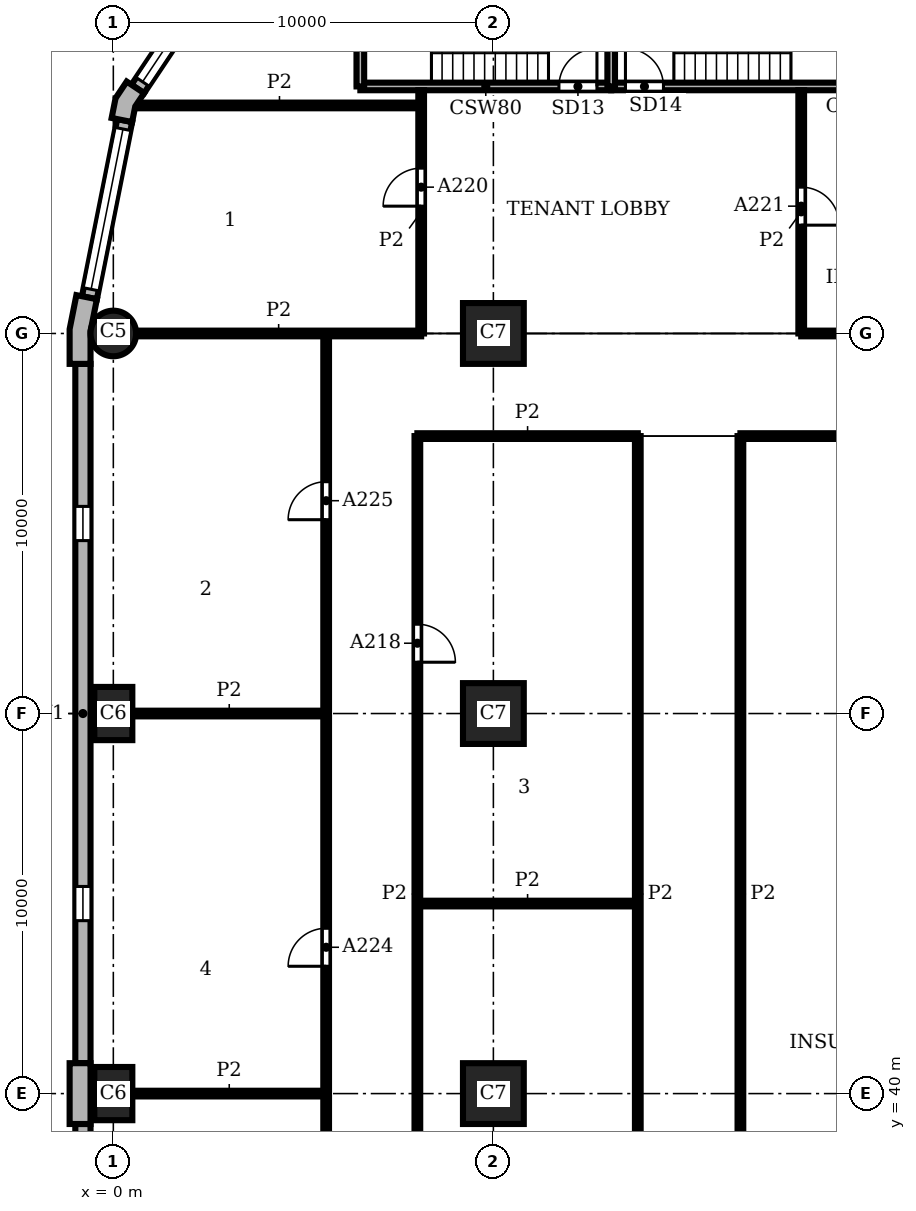
"""IFC4 building model, lengths in metres.
Left out: names, types, materials, properties, quantities, classifications, styles, units other than length and angle.
Written with IfcOpenShell. Run it as: python <this file> out.ifc"""

import sys

from ifc_helpers import new_model, si_unit, direction, frame, frame_2d, origin, origin_2d, place, context, subcontext, project, spatial, polyline, rectangle, circle, outline, extrude, element, fill, save


model = new_model("IFC4")
c1 = context("Model", 3, precision=1e-05, world=origin(), true_north=direction((0.0, 1.0)))
c2 = subcontext(c1, "Body", "Model", "MODEL_VIEW")
j1 = project(units=[si_unit("LENGTHUNIT", "METRE"), si_unit("PLANEANGLEUNIT", "RADIAN")], contexts=[c1])
p1 = place(None, origin())
s1 = spatial("IfcSite", under=j1, at=p1, CompositionType="ELEMENT")
p2 = place(p1, origin())
s2 = spatial("IfcBuilding", under=s1, at=p2, CompositionType="ELEMENT")
p3 = place(p2, frame((0.0, 0.0, 23.7)))
s3 = spatial("IfcBuildingStorey", under=s2, at=p3, CompositionType="ELEMENT", Elevation=23.7)
p4 = place(p3, frame((0.0, 60.0, 0.0), z_axis=(0.0, 0.0, 1.0), x_axis=(1.0, 0.0, 0.0)))
e1 = element("IfcColumn", 1, at=p4, inside=s3, PredefinedType="COLUMN", context=c2, shape_type="SweptSolid", body=[
    extrude(circle(Radius=0.6, at=origin_2d()), origin(), (0.0, 0.0, 1.0), 3.9),
])
for number, where, z_axis, x_axis in (
    (2, (0.0, 50.0, 0.0), (0.0, 0.0, 1.0), (0.0, 1.0, 0.0)),
    (3, (0.0, 40.0, 0.0), (0.0, 0.0, 1.0), (0.0, 1.0, 0.0)),
):
    element("IfcColumn", number, at=place(p3, frame(where, z_axis=z_axis, x_axis=x_axis)), inside=s3, PredefinedType="COLUMN", context=c2, shape_type="SweptSolid", body=[
        extrude(rectangle(XDim=1.4, YDim=1.0, at=origin_2d()), origin(), (0.0, 0.0, 1.0), 3.9),
    ])
for number, where, z_axis, x_axis in (
    (4, (10.0, 40.0, 0.0), (0.0, 0.0, 1.0), (1.0, 0.0, 0.0)),
    (5, (10.0, 50.0, 0.0), (0.0, 0.0, 1.0), (1.0, 0.0, 0.0)),
    (6, (10.0, 60.0, 0.0), (0.0, 0.0, 1.0), (1.0, 0.0, 0.0)),
):
    element("IfcColumn", number, at=place(p3, frame(where, z_axis=z_axis, x_axis=x_axis)), inside=s3, PredefinedType="COLUMN", context=c2, shape_type="SweptSolid", body=[
        extrude(rectangle(XDim=1.6, YDim=1.6, at=origin_2d()), origin(), (0.0, 0.0, 1.0), 3.9),
    ])
p5 = place(p3, origin())
e7 = element("IfcWall", 7, at=p5, inside=s3, PredefinedType="SOLIDWALL", context=c2, shape_type="SweptSolid", body=[
    extrude(outline(polyline([(0.477, 66.545), (0.352, 66.629), (0.059, 66.189), (-0.045, 65.67), (0.103, 65.641), (0.495, 65.563), (0.577, 65.974), (0.81, 66.323), (0.477, 66.545)])), origin(), (0.0, 0.0, 1.0), 3.9),
])
e8 = element("IfcWall", 8, at=p5, inside=s3, PredefinedType="SOLIDWALL", context=c2, shape_type="SweptSolid", body=[
    extrude(outline(polyline([(-0.825, 60.98), (-0.972, 61.009), (-1.15, 60.113), (-1.15, 59.2), (-1.0, 59.2), (-0.6, 59.2), (-0.6, 60.059), (-0.432, 60.902), (-0.825, 60.98)])), origin(), (0.0, 0.0, 1.0), 3.9),
])
e9 = element("IfcWall", 9, at=p5, inside=s3, PredefinedType="SOLIDWALL", context=c2, shape_type="SweptSolid", body=[
    extrude(outline(polyline([(-1.0, 40.8), (-1.15, 40.8), (-1.15, 40.0), (-1.15, 39.2), (-1.0, 39.2), (-0.6, 39.2), (-0.6, 40.0), (-0.6, 40.8), (-1.0, 40.8)])), origin(), (0.0, 0.0, 1.0), 3.9),
])
p6 = place(p3, frame((3.284, 70.386, 0.0), z_axis=(0.0, 0.0, 1.0), x_axis=(-0.555541552266, -0.831488775454, 0.0)))
e10 = element("IfcWall", 10, at=p6, inside=s3, PredefinedType="SOLIDWALL", context=c2, shape_type="SweptSolid", body=[
    extrude(rectangle(XDim=4.753, YDim=0.4, at=frame_2d((2.376, 0.0))), origin(), (0.0, 0.0, 1.0), 3.9),
])
p7 = place(p6, frame((0.226, 0.0, 0.9)))
e11 = element("IfcOpeningElement", 11, at=p7, cuts=e10, PredefinedType="OPENING", context=c2, shape_type="SweptSolid", body=[
    extrude(rectangle(XDim=4.3, YDim=2.35, at=frame_2d((2.15, 1.175))), frame((0.0, 0.21, 0.0), z_axis=(0.0, -1.0, 0.0), x_axis=(1.0, 0.0, 0.0)), (0.0, 0.0, 1.0), 0.42),
])
p8 = place(p3, frame((0.299, 65.602, 0.0), z_axis=(0.0, 0.0, 1.0), x_axis=(-0.195098533057, -0.98078364709, 0.0)))
e12 = element("IfcWall", 12, at=p8, inside=s3, PredefinedType="SOLIDWALL", context=c2, shape_type="SweptSolid", body=[
    extrude(rectangle(XDim=4.753, YDim=0.4, at=frame_2d((2.376, 0.0))), origin(), (0.0, 0.0, 1.0), 3.9),
])
p9 = place(p8, frame((0.226, 0.0, 0.9)))
e13 = element("IfcOpeningElement", 13, at=p9, cuts=e12, PredefinedType="OPENING", context=c2, shape_type="SweptSolid", body=[
    extrude(rectangle(XDim=4.3, YDim=2.35, at=frame_2d((2.15, 1.175))), frame((0.0, 0.21, 0.0), z_axis=(0.0, -1.0, 0.0), x_axis=(1.0, 0.0, 0.0)), (0.0, 0.0, 1.0), 0.42),
])
p10 = place(p3, frame((-0.8, 59.2, 0.0), z_axis=(0.0, 0.0, 1.0), x_axis=(0.0, -1.0, 0.0)))
e14 = element("IfcWall", 14, at=p10, inside=s3, PredefinedType="SOLIDWALL", context=c2, shape_type="SweptSolid", body=[
    extrude(rectangle(XDim=18.4, YDim=0.4, at=frame_2d((9.2, 0.0))), origin(), (0.0, 0.0, 1.0), 3.9),
])
p11 = place(p10, frame((3.75, 0.0, 0.9)))
e15 = element("IfcOpeningElement", 15, at=p11, cuts=e14, PredefinedType="OPENING", context=c2, shape_type="SweptSolid", body=[
    extrude(rectangle(XDim=0.9, YDim=2.35, at=frame_2d((0.45, 1.175))), frame((0.0, 0.21, 0.0), z_axis=(0.0, -1.0, 0.0), x_axis=(1.0, 0.0, 0.0)), (0.0, 0.0, 1.0), 0.42),
])
p12 = place(p10, frame((13.75, 0.0, 0.9)))
e16 = element("IfcOpeningElement", 16, at=p12, cuts=e14, PredefinedType="OPENING", context=c2, shape_type="SweptSolid", body=[
    extrude(rectangle(XDim=0.9, YDim=2.35, at=frame_2d((0.45, 1.175))), frame((0.0, 0.21, 0.0), z_axis=(0.0, -1.0, 0.0), x_axis=(1.0, 0.0, 0.0)), (0.0, 0.0, 1.0), 0.42),
])
p13 = place(p3, frame((-0.8, 39.2, 0.0), z_axis=(0.0, 0.0, 1.0), x_axis=(0.0, -1.0, 0.0)))
e17 = element("IfcWall", 17, at=p13, inside=s3, PredefinedType="SOLIDWALL", context=c2, shape_type="SweptSolid", body=[
    extrude(rectangle(XDim=18.4, YDim=0.4, at=frame_2d((9.2, 0.0))), origin(), (0.0, 0.0, 1.0), 3.9),
])
p14 = place(p13, frame((3.75, 0.0, 0.9)))
e18 = element("IfcOpeningElement", 18, at=p14, cuts=e17, PredefinedType="OPENING", context=c2, shape_type="SweptSolid", body=[
    extrude(rectangle(XDim=0.9, YDim=2.35, at=frame_2d((0.45, 1.175))), frame((0.0, 0.21, 0.0), z_axis=(0.0, -1.0, 0.0), x_axis=(1.0, 0.0, 0.0)), (0.0, 0.0, 1.0), 0.42),
])
p15 = place(p13, frame((13.75, 0.0, 0.9)))
e19 = element("IfcOpeningElement", 19, at=p15, cuts=e17, PredefinedType="OPENING", context=c2, shape_type="SweptSolid", body=[
    extrude(rectangle(XDim=0.9, YDim=2.35, at=frame_2d((0.45, 1.175))), frame((0.0, 0.21, 0.0), z_axis=(0.0, -1.0, 0.0), x_axis=(1.0, 0.0, 0.0)), (0.0, 0.0, 1.0), 0.42),
])
p16 = place(p3, frame((6.5, 66.5, 0.0), z_axis=(0.0, 0.0, 1.0), x_axis=(1.0, 0.0, 0.0)))
e20 = element("IfcWall", 20, at=p16, inside=s3, PredefinedType="SHEAR", context=c2, shape_type="SweptSolid", body=[
    extrude(rectangle(XDim=6.6, YDim=0.2, at=frame_2d((3.3, 0.0))), origin(), (0.0, 0.0, 1.0), 3.58),
])
p17 = place(p16, frame((5.225, 0.0, 0.0)))
e21 = element("IfcOpeningElement", 21, at=p17, cuts=e20, PredefinedType="OPENING", context=c2, shape_type="SweptSolid", body=[
    extrude(rectangle(XDim=1.0, YDim=2.1, at=frame_2d((0.5, 1.05))), frame((0.0, 0.11, 0.0), z_axis=(0.0, -1.0, 0.0), x_axis=(1.0, 0.0, 0.0)), (0.0, 0.0, 1.0), 0.22),
])
p18 = place(p3, frame((13.1, 66.5, 0.0), z_axis=(0.0, 0.0, 1.0), x_axis=(1.0, 0.0, 0.0)))
e22 = element("IfcWall", 22, at=p18, inside=s3, PredefinedType="SHEAR", context=c2, shape_type="SweptSolid", body=[
    extrude(rectangle(XDim=6.6, YDim=0.2, at=frame_2d((3.3, 0.0))), origin(), (0.0, 0.0, 1.0), 3.58),
])
p19 = place(p18, frame((0.375, 0.0, 0.0)))
e23 = element("IfcOpeningElement", 23, at=p19, cuts=e22, PredefinedType="OPENING", context=c2, shape_type="SweptSolid", body=[
    extrude(rectangle(XDim=1.0, YDim=2.1, at=frame_2d((0.5, 1.05))), frame((0.0, 0.11, 0.0), z_axis=(0.0, -1.0, 0.0), x_axis=(1.0, 0.0, 0.0)), (0.0, 0.0, 1.0), 0.22),
])
for number, where, z_axis, x_axis in (
    (24, (6.5, 66.5, 0.0), (0.0, 0.0, 1.0), (0.0, 1.0, 0.0)),
    (25, (13.1, 66.5, 0.0), (0.0, 0.0, 1.0), (0.0, 1.0, 0.0)),
):
    element("IfcWall", number, at=place(p3, frame(where, z_axis=z_axis, x_axis=x_axis)), inside=s3, PredefinedType="SHEAR", context=c2, shape_type="SweptSolid", body=[
        extrude(rectangle(XDim=3.3, YDim=0.2, at=frame_2d((1.65, 0.0))), origin(), (0.0, 0.0, 1.0), 3.58),
    ])
p20 = place(p3, frame((5.6, 5.6, 0.0), z_axis=(0.0, 0.0, 1.0), x_axis=(0.0, 1.0, 0.0)))
e26 = element("IfcWall", 26, at=p20, inside=s3, PredefinedType="PARTITIONING", context=c2, shape_type="SweptSolid", body=[
    extrude(rectangle(XDim=54.4, YDim=0.15, at=frame_2d((27.2, 0.0))), origin(), (0.0, 0.0, 1.0), 3.58),
])
p21 = place(p20, frame((6.0, 0.0, 0.0)))
e27 = element("IfcOpeningElement", 27, at=p21, cuts=e26, PredefinedType="OPENING", context=c2, shape_type="SweptSolid", body=[
    extrude(rectangle(XDim=1.0, YDim=2.1, at=frame_2d((0.5, 1.05))), frame((0.0, 0.085, 0.0), z_axis=(0.0, -1.0, 0.0), x_axis=(1.0, 0.0, 0.0)), (0.0, 0.0, 1.0), 0.17),
])
p22 = place(p20, frame((11.75, 0.0, 0.0)))
e28 = element("IfcOpeningElement", 28, at=p22, cuts=e26, PredefinedType="OPENING", context=c2, shape_type="SweptSolid", body=[
    extrude(rectangle(XDim=1.0, YDim=2.1, at=frame_2d((0.5, 1.05))), frame((0.0, 0.085, 0.0), z_axis=(0.0, -1.0, 0.0), x_axis=(1.0, 0.0, 0.0)), (0.0, 0.0, 1.0), 0.17),
])
p23 = place(p20, frame((18.75, 0.0, 0.0)))
e29 = element("IfcOpeningElement", 29, at=p23, cuts=e26, PredefinedType="OPENING", context=c2, shape_type="SweptSolid", body=[
    extrude(rectangle(XDim=1.0, YDim=2.1, at=frame_2d((0.5, 1.05))), frame((0.0, 0.085, 0.0), z_axis=(0.0, -1.0, 0.0), x_axis=(1.0, 0.0, 0.0)), (0.0, 0.0, 1.0), 0.17),
])
p24 = place(p20, frame((28.3, 0.0, 0.0)))
e30 = element("IfcOpeningElement", 30, at=p24, cuts=e26, PredefinedType="OPENING", context=c2, shape_type="SweptSolid", body=[
    extrude(rectangle(XDim=1.0, YDim=2.1, at=frame_2d((0.5, 1.05))), frame((0.0, 0.085, 0.0), z_axis=(0.0, -1.0, 0.0), x_axis=(1.0, 0.0, 0.0)), (0.0, 0.0, 1.0), 0.17),
])
p25 = place(p20, frame((37.75, 0.0, 0.0)))
e31 = element("IfcOpeningElement", 31, at=p25, cuts=e26, PredefinedType="OPENING", context=c2, shape_type="SweptSolid", body=[
    extrude(rectangle(XDim=1.0, YDim=2.1, at=frame_2d((0.5, 1.05))), frame((0.0, 0.085, 0.0), z_axis=(0.0, -1.0, 0.0), x_axis=(1.0, 0.0, 0.0)), (0.0, 0.0, 1.0), 0.17),
])
p26 = place(p20, frame((49.5, 0.0, 0.0)))
e32 = element("IfcOpeningElement", 32, at=p26, cuts=e26, PredefinedType="OPENING", context=c2, shape_type="SweptSolid", body=[
    extrude(rectangle(XDim=1.0, YDim=2.1, at=frame_2d((0.5, 1.05))), frame((0.0, 0.085, 0.0), z_axis=(0.0, -1.0, 0.0), x_axis=(1.0, 0.0, 0.0)), (0.0, 0.0, 1.0), 0.17),
])
p27 = place(p3, frame((8.0, 33.2, 0.0), z_axis=(0.0, 0.0, 1.0), x_axis=(0.0, 1.0, 0.0)))
e33 = element("IfcWall", 33, at=p27, inside=s3, PredefinedType="PARTITIONING", context=c2, shape_type="SweptSolid", body=[
    extrude(rectangle(XDim=24.1, YDim=0.15, at=frame_2d((12.05, 0.0))), origin(), (0.0, 0.0, 1.0), 3.58),
])
p28 = place(p27, frame((3.35, 0.0, 0.0)))
e34 = element("IfcOpeningElement", 34, at=p28, cuts=e33, PredefinedType="OPENING", context=c2, shape_type="SweptSolid", body=[
    extrude(rectangle(XDim=1.8, YDim=2.1, at=frame_2d((0.9, 1.05))), frame((0.0, 0.085, 0.0), z_axis=(0.0, -1.0, 0.0), x_axis=(1.0, 0.0, 0.0)), (0.0, 0.0, 1.0), 0.17),
])
p29 = place(p27, frame((18.15, 0.0, 0.0)))
e35 = element("IfcOpeningElement", 35, at=p29, cuts=e33, PredefinedType="OPENING", context=c2, shape_type="SweptSolid", body=[
    extrude(rectangle(XDim=1.0, YDim=2.1, at=frame_2d((0.5, 1.05))), frame((0.0, 0.085, 0.0), z_axis=(0.0, -1.0, 0.0), x_axis=(1.0, 0.0, 0.0)), (0.0, 0.0, 1.0), 0.17),
])
p30 = place(p3, frame((8.1, 60.0, 0.0), z_axis=(0.0, 0.0, 1.0), x_axis=(0.0, 1.0, 0.0)))
e36 = element("IfcWall", 36, at=p30, inside=s3, PredefinedType="PARTITIONING", context=c2, shape_type="SweptSolid", body=[
    extrude(rectangle(XDim=6.4, YDim=0.15, at=frame_2d((3.2, 0.0))), origin(), (0.0, 0.0, 1.0), 3.58),
])
p31 = place(p30, frame((3.35, 0.0, 0.0)))
e37 = element("IfcOpeningElement", 37, at=p31, cuts=e36, PredefinedType="OPENING", context=c2, shape_type="SweptSolid", body=[
    extrude(rectangle(XDim=1.0, YDim=2.1, at=frame_2d((0.5, 1.05))), frame((0.0, 0.085, 0.0), z_axis=(0.0, -1.0, 0.0), x_axis=(1.0, 0.0, 0.0)), (0.0, 0.0, 1.0), 0.17),
])
for number, where, z_axis, x_axis in (
    (38, (13.8, 33.2, 0.0), (0.0, 0.0, 1.0), (0.0, 1.0, 0.0)),
    (39, (16.5, 33.2, 0.0), (0.0, 0.0, 1.0), (0.0, 1.0, 0.0)),
):
    element("IfcWall", number, at=place(p3, frame(where, z_axis=z_axis, x_axis=x_axis)), inside=s3, PredefinedType="PARTITIONING", context=c2, shape_type="SweptSolid", body=[
        extrude(rectangle(XDim=24.1, YDim=0.15, at=frame_2d((12.05, 0.0))), origin(), (0.0, 0.0, 1.0), 3.58),
    ])
p32 = place(p3, frame((18.1, 60.0, 0.0), z_axis=(0.0, 0.0, 1.0), x_axis=(0.0, 1.0, 0.0)))
e40 = element("IfcWall", 40, at=p32, inside=s3, PredefinedType="PARTITIONING", context=c2, shape_type="SweptSolid", body=[
    extrude(rectangle(XDim=6.4, YDim=0.15, at=frame_2d((3.2, 0.0))), origin(), (0.0, 0.0, 1.0), 3.58),
])
p33 = place(p32, frame((2.85, 0.0, 0.0)))
e41 = element("IfcOpeningElement", 41, at=p33, cuts=e40, PredefinedType="OPENING", context=c2, shape_type="SweptSolid", body=[
    extrude(rectangle(XDim=1.0, YDim=2.1, at=frame_2d((0.5, 1.05))), frame((0.0, 0.085, 0.0), z_axis=(0.0, -1.0, 0.0), x_axis=(1.0, 0.0, 0.0)), (0.0, 0.0, 1.0), 0.17),
])
p34 = place(p3, frame((0.5, 40.0, 0.0), z_axis=(0.0, 0.0, 1.0), x_axis=(1.0, 0.0, 0.0)))
e42 = element("IfcWall", 42, at=p34, inside=s3, PredefinedType="PARTITIONING", context=c2, shape_type="SweptSolid", body=[
    extrude(rectangle(XDim=5.1, YDim=0.15, at=frame_2d((2.55, 0.0))), origin(), (0.0, 0.0, 1.0), 3.58),
])
p35 = place(p3, frame((8.0, 45.0, 0.0), z_axis=(0.0, 0.0, 1.0), x_axis=(1.0, 0.0, 0.0)))
e43 = element("IfcWall", 43, at=p35, inside=s3, PredefinedType="PARTITIONING", context=c2, shape_type="SweptSolid", body=[
    extrude(rectangle(XDim=5.8, YDim=0.15, at=frame_2d((2.9, 0.0))), origin(), (0.0, 0.0, 1.0), 3.58),
])
p36 = place(p3, frame((0.5, 50.0, 0.0), z_axis=(0.0, 0.0, 1.0), x_axis=(1.0, 0.0, 0.0)))
e44 = element("IfcWall", 44, at=p36, inside=s3, PredefinedType="PARTITIONING", context=c2, shape_type="SweptSolid", body=[
    extrude(rectangle(XDim=5.1, YDim=0.15, at=frame_2d((2.55, 0.0))), origin(), (0.0, 0.0, 1.0), 3.58),
])
p37 = place(p3, frame((8.0, 57.3, 0.0), z_axis=(0.0, 0.0, 1.0), x_axis=(1.0, 0.0, 0.0)))
e45 = element("IfcWall", 45, at=p37, inside=s3, PredefinedType="PARTITIONING", context=c2, shape_type="SweptSolid", body=[
    extrude(rectangle(XDim=5.8, YDim=0.15, at=frame_2d((2.9, 0.0))), origin(), (0.0, 0.0, 1.0), 3.58),
])
p38 = place(p3, frame((16.5, 57.3, 0.0), z_axis=(0.0, 0.0, 1.0), x_axis=(1.0, 0.0, 0.0)))
e46 = element("IfcWall", 46, at=p38, inside=s3, PredefinedType="PARTITIONING", context=c2, shape_type="SweptSolid", body=[
    extrude(rectangle(XDim=8.5, YDim=0.15, at=frame_2d((4.25, 0.0))), origin(), (0.0, 0.0, 1.0), 3.58),
])
p39 = place(p3, frame((0.6, 60.0, 0.0), z_axis=(0.0, 0.0, 1.0), x_axis=(1.0, 0.0, 0.0)))
e47 = element("IfcWall", 47, at=p39, inside=s3, PredefinedType="PARTITIONING", context=c2, shape_type="SweptSolid", body=[
    extrude(rectangle(XDim=7.5, YDim=0.15, at=frame_2d((3.75, 0.0))), origin(), (0.0, 0.0, 1.0), 3.58),
])
p40 = place(p3, frame((18.1, 60.0, 0.0), z_axis=(0.0, 0.0, 1.0), x_axis=(1.0, 0.0, 0.0)))
e48 = element("IfcWall", 48, at=p40, inside=s3, PredefinedType="PARTITIONING", context=c2, shape_type="SweptSolid", body=[
    extrude(rectangle(XDim=1.1, YDim=0.15, at=frame_2d((0.55, 0.0))), origin(), (0.0, 0.0, 1.0), 3.58),
])
p41 = place(p3, frame((0.644, 66.0, 0.0), z_axis=(0.0, 0.0, 1.0), x_axis=(1.0, 0.0, 0.0)))
e49 = element("IfcWall", 49, at=p41, inside=s3, PredefinedType="PARTITIONING", context=c2, shape_type="SweptSolid", body=[
    extrude(rectangle(XDim=7.456, YDim=0.15, at=frame_2d((3.728, 0.0))), origin(), (0.0, 0.0, 1.0), 3.58),
])
p42 = place(p7, origin())
e50 = element("IfcWindow", 50, at=p42, inside=s3, PartitioningType="SINGLE_PANEL", PredefinedType="WINDOW", context=c2, shape_type="SweptSolid", body=[
    extrude(rectangle(XDim=4.3, YDim=2.35, at=frame_2d((2.15, 1.175))), frame((0.0, 0.16, 0.0), z_axis=(0.0, -1.0, 0.0), x_axis=(1.0, 0.0, 0.0)), (0.0, 0.0, 1.0), 0.06),
])
fill(e11, e50)
p43 = place(p9, origin())
e51 = element("IfcWindow", 51, at=p43, inside=s3, PartitioningType="SINGLE_PANEL", PredefinedType="WINDOW", context=c2, shape_type="SweptSolid", body=[
    extrude(rectangle(XDim=4.3, YDim=2.35, at=frame_2d((2.15, 1.175))), frame((0.0, 0.16, 0.0), z_axis=(0.0, -1.0, 0.0), x_axis=(1.0, 0.0, 0.0)), (0.0, 0.0, 1.0), 0.06),
])
fill(e13, e51)
p44 = place(p11, origin())
e52 = element("IfcWindow", 52, at=p44, inside=s3, PartitioningType="SINGLE_PANEL", PredefinedType="WINDOW", context=c2, shape_type="SweptSolid", body=[
    extrude(rectangle(XDim=0.9, YDim=2.35, at=frame_2d((0.45, 1.175))), frame((0.0, 0.16, 0.0), z_axis=(0.0, -1.0, 0.0), x_axis=(1.0, 0.0, 0.0)), (0.0, 0.0, 1.0), 0.06),
])
fill(e15, e52)
p45 = place(p12, origin())
e53 = element("IfcWindow", 53, at=p45, inside=s3, PartitioningType="SINGLE_PANEL", PredefinedType="WINDOW", context=c2, shape_type="SweptSolid", body=[
    extrude(rectangle(XDim=0.9, YDim=2.35, at=frame_2d((0.45, 1.175))), frame((0.0, 0.16, 0.0), z_axis=(0.0, -1.0, 0.0), x_axis=(1.0, 0.0, 0.0)), (0.0, 0.0, 1.0), 0.06),
])
fill(e16, e53)
p46 = place(p17, origin())
e54 = element("IfcDoor", 54, at=p46, inside=s3, OperationType="SINGLE_SWING_RIGHT", PredefinedType="DOOR", context=c2, shape_type="SweptSolid", body=[
    extrude(rectangle(XDim=1.0, YDim=2.1, at=frame_2d((0.5, 1.05))), frame((0.0, 0.025, 0.0), z_axis=(0.0, -1.0, 0.0), x_axis=(1.0, 0.0, 0.0)), (0.0, 0.0, 1.0), 0.05),
])
fill(e21, e54)
p47 = place(p19, origin())
e55 = element("IfcDoor", 55, at=p47, inside=s3, OperationType="SINGLE_SWING_LEFT", PredefinedType="DOOR", context=c2, shape_type="SweptSolid", body=[
    extrude(rectangle(XDim=1.0, YDim=2.1, at=frame_2d((0.5, 1.05))), frame((0.0, 0.025, 0.0), z_axis=(0.0, -1.0, 0.0), x_axis=(1.0, 0.0, 0.0)), (0.0, 0.0, 1.0), 0.05),
])
fill(e23, e55)
p48 = place(p29, frame((1.0, 0.0, 0.0), z_axis=(0.0, 0.0, 1.0), x_axis=(-1.0, 0.0, 0.0)))
e56 = element("IfcDoor", 56, at=p48, inside=s3, OperationType="SINGLE_SWING_RIGHT", PredefinedType="DOOR", context=c2, shape_type="SweptSolid", body=[
    extrude(rectangle(XDim=1.0, YDim=2.1, at=frame_2d((0.5, 1.05))), frame((0.0, 0.025, 0.0), z_axis=(0.0, -1.0, 0.0), x_axis=(1.0, 0.0, 0.0)), (0.0, 0.0, 1.0), 0.05),
])
fill(e35, e56)
p49 = place(p31, origin())
e57 = element("IfcDoor", 57, at=p49, inside=s3, OperationType="SINGLE_SWING_LEFT", PredefinedType="DOOR", context=c2, shape_type="SweptSolid", body=[
    extrude(rectangle(XDim=1.0, YDim=2.1, at=frame_2d((0.5, 1.05))), frame((0.0, 0.025, 0.0), z_axis=(0.0, -1.0, 0.0), x_axis=(1.0, 0.0, 0.0)), (0.0, 0.0, 1.0), 0.05),
])
fill(e37, e57)
p50 = place(p33, frame((1.0, 0.0, 0.0), z_axis=(0.0, 0.0, 1.0), x_axis=(-1.0, 0.0, 0.0)))
e58 = element("IfcDoor", 58, at=p50, inside=s3, OperationType="SINGLE_SWING_RIGHT", PredefinedType="DOOR", context=c2, shape_type="SweptSolid", body=[
    extrude(rectangle(XDim=1.0, YDim=2.1, at=frame_2d((0.5, 1.05))), frame((0.0, 0.025, 0.0), z_axis=(0.0, -1.0, 0.0), x_axis=(1.0, 0.0, 0.0)), (0.0, 0.0, 1.0), 0.05),
])
fill(e41, e58)
p51 = place(p25, origin())
e59 = element("IfcDoor", 59, at=p51, inside=s3, OperationType="SINGLE_SWING_LEFT", PredefinedType="DOOR", context=c2, shape_type="SweptSolid", body=[
    extrude(rectangle(XDim=1.0, YDim=2.1, at=frame_2d((0.5, 1.05))), frame((0.0, 0.025, 0.0), z_axis=(0.0, -1.0, 0.0), x_axis=(1.0, 0.0, 0.0)), (0.0, 0.0, 1.0), 0.05),
])
fill(e31, e59)
p52 = place(p26, origin())
e60 = element("IfcDoor", 60, at=p52, inside=s3, OperationType="SINGLE_SWING_LEFT", PredefinedType="DOOR", context=c2, shape_type="SweptSolid", body=[
    extrude(rectangle(XDim=1.0, YDim=2.1, at=frame_2d((0.5, 1.05))), frame((0.0, 0.025, 0.0), z_axis=(0.0, -1.0, 0.0), x_axis=(1.0, 0.0, 0.0)), (0.0, 0.0, 1.0), 0.05),
])
fill(e32, e60)
save(model, sys.argv[1])
